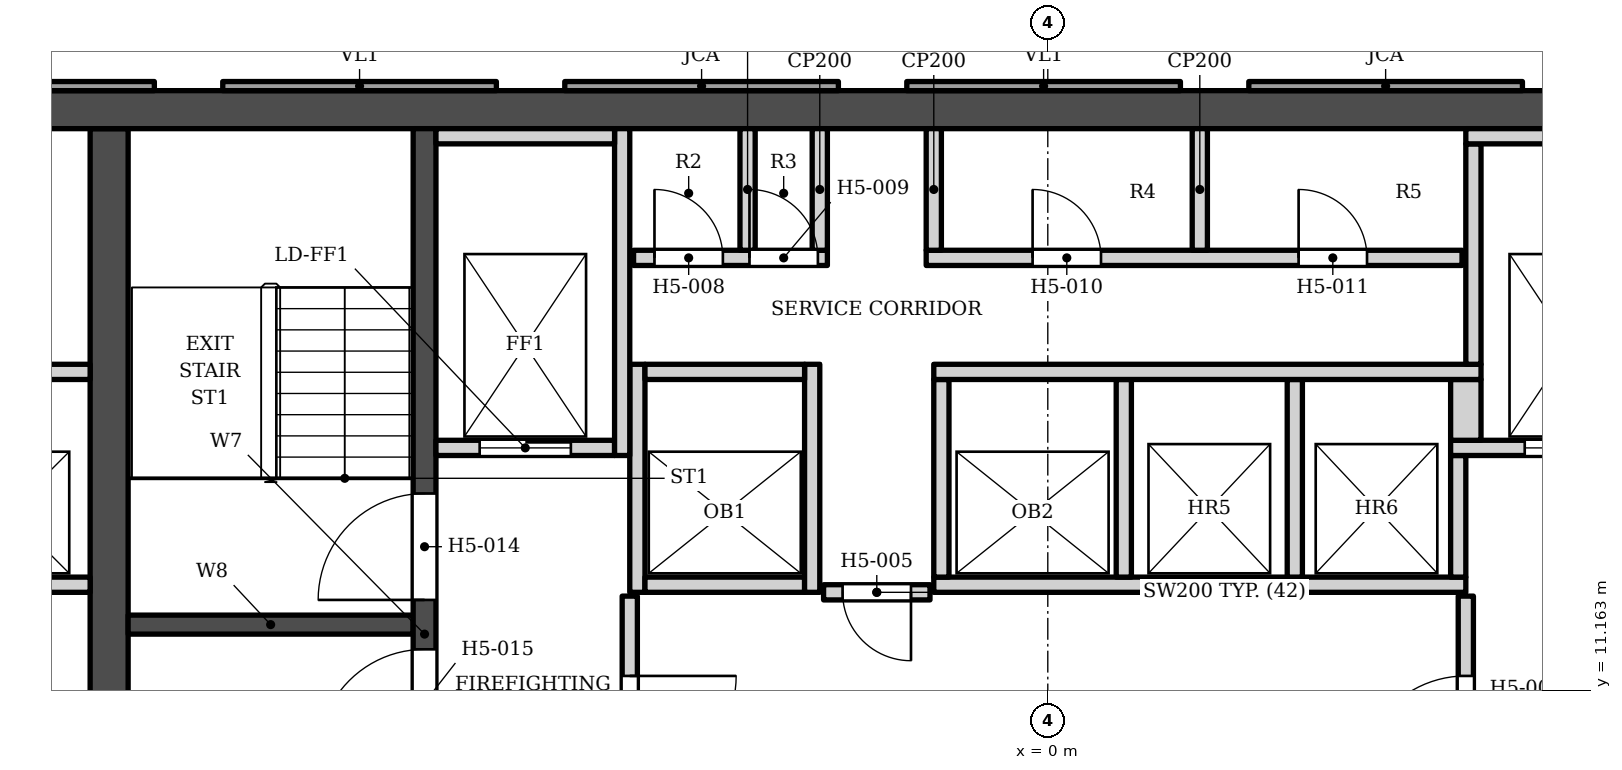
"""IFC4 building model, lengths in metres.
Left out: names, types, materials, properties, quantities, classifications, styles, units other than length and angle.
Written with IfcOpenShell. Run it as: python <this file> out.ifc"""

import sys

from ifc_helpers import new_model, si_unit, direction, frame, frame_2d, origin, place, context, subcontext, project, spatial, polyline, rectangle, outline, extrude, element, fill, save


model = new_model("IFC4")
c1 = context("Model", 3, precision=1e-05, world=origin(), true_north=direction((0.0, 1.0)))
c2 = subcontext(c1, "Body", "Model", "MODEL_VIEW")
j1 = project(units=[si_unit("LENGTHUNIT", "METRE"), si_unit("PLANEANGLEUNIT", "RADIAN")], contexts=[c1])
p1 = place(None, origin())
s1 = spatial("IfcSite", under=j1, at=p1, CompositionType="ELEMENT")
p2 = place(p1, origin())
s2 = spatial("IfcBuilding", under=s1, at=p2, CompositionType="ELEMENT")
p3 = place(p2, frame((0.0, 0.0, 91.8)))
s3 = spatial("IfcBuildingStorey", under=s2, at=p3, CompositionType="ELEMENT", Elevation=91.8)
p4 = place(p3, frame((-16.9, 18.802, 0.0), z_axis=(0.0, 0.0, 1.0), x_axis=(1.0, 0.0, 0.0)))
e1 = element("IfcWall", 1, at=p4, inside=s3, PredefinedType="SHEAR", context=c2, shape_type="SweptSolid", body=[
    extrude(rectangle(XDim=33.8, YDim=0.5, at=frame_2d((16.9, 0.0))), origin(), (0.0, 0.0, 1.0), 3.4),
])
p5 = place(p3, frame((-12.35, 5.253, 0.0), z_axis=(0.0, 0.0, 1.0), x_axis=(0.0, 1.0, 0.0)))
e2 = element("IfcWall", 2, at=p5, inside=s3, PredefinedType="SHEAR", context=c2, shape_type="SweptSolid", body=[
    extrude(rectangle(XDim=13.3, YDim=0.5, at=frame_2d((6.65, 0.0))), origin(), (0.0, 0.0, 1.0), 3.4),
])
p6 = place(p3, frame((-8.2, 5.253, 0.0), z_axis=(0.0, 0.0, 1.0), x_axis=(0.0, 1.0, 0.0)))
e3 = element("IfcWall", 3, at=p6, inside=s3, PredefinedType="SHEAR", context=c2, shape_type="SweptSolid", body=[
    extrude(rectangle(XDim=13.3, YDim=0.3, at=frame_2d((6.65, 0.0))), origin(), (0.0, 0.0, 1.0), 3.4),
])
p7 = place(p6, frame((7.1, 0.0, 0.0)))
e4 = element("IfcOpeningElement", 4, at=p7, cuts=e3, PredefinedType="OPENING", context=c2, shape_type="SweptSolid", body=[
    extrude(rectangle(XDim=1.4, YDim=2.1, at=frame_2d((0.7, 1.05))), frame((0.0, 0.16, 0.0), z_axis=(0.0, -1.0, 0.0), x_axis=(1.0, 0.0, 0.0)), (0.0, 0.0, 1.0), 0.32),
])
p8 = place(p6, frame((5.05, 0.0, 0.0)))
e5 = element("IfcOpeningElement", 5, at=p8, cuts=e3, PredefinedType="OPENING", context=c2, shape_type="SweptSolid", body=[
    extrude(rectangle(XDim=1.4, YDim=2.1, at=frame_2d((0.7, 1.05))), frame((0.0, 0.16, 0.0), z_axis=(0.0, -1.0, 0.0), x_axis=(1.0, 0.0, 0.0)), (0.0, 0.0, 1.0), 0.32),
])
p9 = place(p3, frame((-12.1, 12.028, 0.0), z_axis=(0.0, 0.0, 1.0), x_axis=(1.0, 0.0, 0.0)))
e6 = element("IfcWall", 6, at=p9, inside=s3, PredefinedType="SHEAR", context=c2, shape_type="SweptSolid", body=[
    extrude(rectangle(XDim=3.75, YDim=0.25, at=frame_2d((1.875, 0.0))), origin(), (0.0, 0.0, 1.0), 3.4),
])
p10 = place(p3, origin())
e7 = element("IfcWall", 7, at=p10, inside=s3, PredefinedType="SOLIDWALL", context=c2, shape_type="SweptSolid", body=[
    extrude(outline(polyline([(2.645, 19.173), (2.645, 19.052), (6.245, 19.052), (6.245, 19.173), (2.645, 19.173)])), origin(), (0.0, 0.0, 1.0), 2.65),
])
p11 = place(p3, origin())
e8 = element("IfcWall", 8, at=p11, inside=s3, PredefinedType="ELEMENTEDWALL", context=c2, shape_type="SweptSolid", body=[
    extrude(outline(polyline([(-1.855, 19.173), (-1.855, 19.052), (1.745, 19.052), (1.745, 19.173), (-1.855, 19.173)])), origin(), (0.0, 0.0, 1.0), 2.65),
])
p12 = place(p3, origin())
e9 = element("IfcWall", 9, at=p12, inside=s3, PredefinedType="SOLIDWALL", context=c2, shape_type="SweptSolid", body=[
    extrude(outline(polyline([(-6.355, 19.173), (-6.355, 19.052), (-2.755, 19.052), (-2.755, 19.173), (-6.355, 19.173)])), origin(), (0.0, 0.0, 1.0), 2.65),
])
p13 = place(p3, origin())
e10 = element("IfcWall", 10, at=p13, inside=s3, PredefinedType="ELEMENTEDWALL", context=c2, shape_type="SweptSolid", body=[
    extrude(outline(polyline([(-10.855, 19.173), (-10.855, 19.052), (-7.255, 19.052), (-7.255, 19.173), (-10.855, 19.173)])), origin(), (0.0, 0.0, 1.0), 2.65),
])
p14 = place(p3, origin())
e11 = element("IfcWall", 11, at=p14, inside=s3, PredefinedType="SOLIDWALL", context=c2, shape_type="SweptSolid", body=[
    extrude(outline(polyline([(-15.354, 19.173), (-15.354, 19.052), (-11.755, 19.052), (-11.755, 19.173), (-15.354, 19.173)])), origin(), (0.0, 0.0, 1.0), 2.65),
])
p15 = place(p3, frame((-5.5, 9.103, 0.0), z_axis=(0.0, 0.0, 1.0), x_axis=(0.0, 1.0, 0.0)))
e12 = element("IfcWall", 12, at=p15, inside=s3, PredefinedType="SOLIDWALL", context=c2, shape_type="SweptSolid", body=[
    extrude(rectangle(XDim=3.3, YDim=0.2, at=frame_2d((1.65, 0.0))), origin(), (0.0, 0.0, 1.0), 3.23),
])
p16 = place(p15, frame((0.85, 0.0, 0.0)))
e13 = element("IfcOpeningElement", 13, at=p16, cuts=e12, PredefinedType="OPENING", context=c2, shape_type="SweptSolid", body=[
    extrude(rectangle(XDim=1.4, YDim=2.1, at=frame_2d((0.7, 1.05))), frame((0.0, 0.11, 0.0), z_axis=(0.0, -1.0, 0.0), x_axis=(1.0, 0.0, 0.0)), (0.0, 0.0, 1.0), 0.22),
])
p17 = place(p3, frame((5.5, 9.103, 0.0), z_axis=(0.0, 0.0, 1.0), x_axis=(0.0, 1.0, 0.0)))
e14 = element("IfcWall", 14, at=p17, inside=s3, PredefinedType="SOLIDWALL", context=c2, shape_type="SweptSolid", body=[
    extrude(rectangle(XDim=3.3, YDim=0.2, at=frame_2d((1.65, 0.0))), origin(), (0.0, 0.0, 1.0), 3.23),
])
p18 = place(p17, frame((0.85, 0.0, 0.0)))
e15 = element("IfcOpeningElement", 15, at=p18, cuts=e14, PredefinedType="OPENING", context=c2, shape_type="SweptSolid", body=[
    extrude(rectangle(XDim=1.4, YDim=2.1, at=frame_2d((0.7, 1.05))), frame((0.0, 0.11, 0.0), z_axis=(0.0, -1.0, 0.0), x_axis=(1.0, 0.0, 0.0)), (0.0, 0.0, 1.0), 0.22),
])
p19 = place(p3, frame((-2.95, 12.453, 0.0), z_axis=(0.0, 0.0, 1.0), x_axis=(1.0, 0.0, 0.0)))
e16 = element("IfcWall", 16, at=p19, inside=s3, PredefinedType="SOLIDWALL", context=c2, shape_type="SweptSolid", body=[
    extrude(rectangle(XDim=1.4, YDim=0.2, at=frame_2d((0.7, 0.0))), origin(), (0.0, 0.0, 1.0), 3.23),
])
p20 = place(p19, frame((0.25, 0.0, 0.0)))
e17 = element("IfcOpeningElement", 17, at=p20, cuts=e16, PredefinedType="OPENING", context=c2, shape_type="SweptSolid", body=[
    extrude(rectangle(XDim=0.9, YDim=2.1, at=frame_2d((0.45, 1.05))), frame((0.0, 0.11, 0.0), z_axis=(0.0, -1.0, 0.0), x_axis=(1.0, 0.0, 0.0)), (0.0, 0.0, 1.0), 0.22),
])
p21 = place(p3, frame((-16.9, 12.552, 0.0), z_axis=(0.0, 0.0, 1.0), x_axis=(1.0, 0.0, 0.0)))
e18 = element("IfcWall", 18, at=p21, inside=s3, PredefinedType="SOLIDWALL", context=c2, shape_type="SweptSolid", body=[
    extrude(rectangle(XDim=4.3, YDim=0.2, at=frame_2d((2.15, 0.0))), origin(), (0.0, 0.0, 1.0), 3.23),
])
p22 = place(p21, frame((2.675, 0.0, 0.0)))
e19 = element("IfcOpeningElement", 19, at=p22, cuts=e18, PredefinedType="OPENING", context=c2, shape_type="SweptSolid", body=[
    extrude(rectangle(XDim=1.1, YDim=2.1, at=frame_2d((0.55, 1.05))), frame((0.0, 0.11, 0.0), z_axis=(0.0, -1.0, 0.0), x_axis=(1.0, 0.0, 0.0)), (0.0, 0.0, 1.0), 0.22),
])
p23 = place(p21, frame((0.425, 0.0, 0.0)))
e20 = element("IfcOpeningElement", 20, at=p23, cuts=e18, PredefinedType="OPENING", context=c2, shape_type="SweptSolid", body=[
    extrude(rectangle(XDim=1.1, YDim=2.1, at=frame_2d((0.55, 1.05))), frame((0.0, 0.11, 0.0), z_axis=(0.0, -1.0, 0.0), x_axis=(1.0, 0.0, 0.0)), (0.0, 0.0, 1.0), 0.22),
])
p24 = place(p3, frame((-5.4, 12.453, 0.0), z_axis=(0.0, 0.0, 1.0), x_axis=(0.0, 1.0, 0.0)))
e21 = element("IfcWall", 21, at=p24, inside=s3, PredefinedType="SOLIDWALL", context=c2, shape_type="SweptSolid", body=[
    extrude(rectangle(XDim=3.0, YDim=0.2, at=frame_2d((1.5, 0.0))), origin(), (0.0, 0.0, 1.0), 3.23),
])
p25 = place(p3, frame((-5.3, 12.552, 0.0), z_axis=(0.0, 0.0, 1.0), x_axis=(1.0, 0.0, 0.0)))
e22 = element("IfcWall", 22, at=p25, inside=s3, PredefinedType="SOLIDWALL", context=c2, shape_type="SweptSolid", body=[
    extrude(rectangle(XDim=2.1, YDim=0.2, at=frame_2d((1.05, 0.0))), origin(), (0.0, 0.0, 1.0), 3.23),
])
p26 = place(p3, frame((-3.1, 12.453, 0.0), z_axis=(0.0, 0.0, 1.0), x_axis=(0.0, 1.0, 0.0)))
e23 = element("IfcWall", 23, at=p26, inside=s3, PredefinedType="SOLIDWALL", context=c2, shape_type="SweptSolid", body=[
    extrude(rectangle(XDim=3.0, YDim=0.2, at=frame_2d((1.5, 0.0))), origin(), (0.0, 0.0, 1.0), 3.23),
])
p27 = place(p3, frame((-1.5, 12.552, 0.0), z_axis=(0.0, 0.0, 1.0), x_axis=(1.0, 0.0, 0.0)))
e24 = element("IfcWall", 24, at=p27, inside=s3, PredefinedType="SOLIDWALL", context=c2, shape_type="SweptSolid", body=[
    extrude(rectangle(XDim=7.0, YDim=0.2, at=frame_2d((3.5, 0.0))), origin(), (0.0, 0.0, 1.0), 3.23),
])
for number, where, z_axis, x_axis in (
    (25, (-1.4, 12.653, 0.0), (0.0, 0.0, 1.0), (0.0, 1.0, 0.0)),
    (26, (1.0, 12.653, 0.0), (0.0, 0.0, 1.0), (0.0, 1.0, 0.0)),
    (27, (3.25, 12.653, 0.0), (0.0, 0.0, 1.0), (0.0, 1.0, 0.0)),
):
    element("IfcWall", number, at=place(p3, frame(where, z_axis=z_axis, x_axis=x_axis)), inside=s3, PredefinedType="SOLIDWALL", context=c2, shape_type="SweptSolid", body=[
        extrude(rectangle(XDim=2.6, YDim=0.2, at=frame_2d((1.3, 0.0))), origin(), (0.0, 0.0, 1.0), 3.23),
    ])
p28 = place(p3, frame((5.4, 12.653, 0.0), z_axis=(0.0, 0.0, 1.0), x_axis=(0.0, 1.0, 0.0)))
e28 = element("IfcWall", 28, at=p28, inside=s3, PredefinedType="SOLIDWALL", context=c2, shape_type="SweptSolid", body=[
    extrude(rectangle(XDim=1.6, YDim=0.2, at=frame_2d((0.8, 0.0))), origin(), (0.0, 0.0, 1.0), 3.23),
])
p29 = place(p3, frame((-8.05, 14.353, 0.0), z_axis=(0.0, 0.0, 1.0), x_axis=(1.0, 0.0, 0.0)))
e29 = element("IfcWall", 29, at=p29, inside=s3, PredefinedType="SOLIDWALL", context=c2, shape_type="SweptSolid", body=[
    extrude(rectangle(XDim=2.35, YDim=0.2, at=frame_2d((1.175, 0.0))), origin(), (0.0, 0.0, 1.0), 3.23),
])
p30 = place(p29, frame((0.575, 0.0, 0.0)))
e30 = element("IfcOpeningElement", 30, at=p30, cuts=e29, PredefinedType="OPENING", context=c2, shape_type="SweptSolid", body=[
    extrude(rectangle(XDim=1.2, YDim=2.1, at=frame_2d((0.6, 1.05))), frame((0.0, 0.11, 0.0), z_axis=(0.0, -1.0, 0.0), x_axis=(1.0, 0.0, 0.0)), (0.0, 0.0, 1.0), 0.22),
])
p31 = place(p3, frame((-5.6, 14.253, 0.0), z_axis=(0.0, 0.0, 1.0), x_axis=(0.0, 1.0, 0.0)))
e31 = element("IfcWall", 31, at=p31, inside=s3, PredefinedType="SOLIDWALL", context=c2, shape_type="SweptSolid", body=[
    extrude(rectangle(XDim=4.3, YDim=0.2, at=frame_2d((2.15, 0.0))), origin(), (0.0, 0.0, 1.0), 3.23),
])
p32 = place(p3, frame((5.3, 14.353, 0.0), z_axis=(0.0, 0.0, 1.0), x_axis=(1.0, 0.0, 0.0)))
e32 = element("IfcWall", 32, at=p32, inside=s3, PredefinedType="SOLIDWALL", context=c2, shape_type="SweptSolid", body=[
    extrude(rectangle(XDim=2.75, YDim=0.2, at=frame_2d((1.375, 0.0))), origin(), (0.0, 0.0, 1.0), 3.23),
])
p33 = place(p32, frame((0.975, 0.0, 0.0)))
e33 = element("IfcOpeningElement", 33, at=p33, cuts=e32, PredefinedType="OPENING", context=c2, shape_type="SweptSolid", body=[
    extrude(rectangle(XDim=1.2, YDim=2.1, at=frame_2d((0.6, 1.05))), frame((0.0, 0.11, 0.0), z_axis=(0.0, -1.0, 0.0), x_axis=(1.0, 0.0, 0.0)), (0.0, 0.0, 1.0), 0.22),
])
p34 = place(p3, frame((5.5, 14.453, 0.0), z_axis=(0.0, 0.0, 1.0), x_axis=(0.0, 1.0, 0.0)))
e34 = element("IfcWall", 34, at=p34, inside=s3, PredefinedType="SOLIDWALL", context=c2, shape_type="SweptSolid", body=[
    extrude(rectangle(XDim=0.8, YDim=0.4, at=frame_2d((0.4, 0.0))), origin(), (0.0, 0.0, 1.0), 3.23),
])
p35 = place(p3, frame((-16.9, 15.353, 0.0), z_axis=(0.0, 0.0, 1.0), x_axis=(1.0, 0.0, 0.0)))
e35 = element("IfcWall", 35, at=p35, inside=s3, PredefinedType="SOLIDWALL", context=c2, shape_type="SweptSolid", body=[
    extrude(rectangle(XDim=4.3, YDim=0.2, at=frame_2d((2.15, 0.0))), origin(), (0.0, 0.0, 1.0), 3.23),
])
p36 = place(p3, frame((-5.3, 15.353, 0.0), z_axis=(0.0, 0.0, 1.0), x_axis=(1.0, 0.0, 0.0)))
e36 = element("IfcWall", 36, at=p36, inside=s3, PredefinedType="SOLIDWALL", context=c2, shape_type="SweptSolid", body=[
    extrude(rectangle(XDim=2.1, YDim=0.2, at=frame_2d((1.05, 0.0))), origin(), (0.0, 0.0, 1.0), 3.23),
])
p37 = place(p3, frame((-1.5, 15.353, 0.0), z_axis=(0.0, 0.0, 1.0), x_axis=(1.0, 0.0, 0.0)))
e37 = element("IfcWall", 37, at=p37, inside=s3, PredefinedType="SOLIDWALL", context=c2, shape_type="SweptSolid", body=[
    extrude(rectangle(XDim=7.2, YDim=0.2, at=frame_2d((3.6, 0.0))), origin(), (0.0, 0.0, 1.0), 3.23),
])
p38 = place(p3, frame((5.6, 15.453, 0.0), z_axis=(0.0, 0.0, 1.0), x_axis=(0.0, 1.0, 0.0)))
e38 = element("IfcWall", 38, at=p38, inside=s3, PredefinedType="SOLIDWALL", context=c2, shape_type="SweptSolid", body=[
    extrude(rectangle(XDim=2.9, YDim=0.2, at=frame_2d((1.45, 0.0))), origin(), (0.0, 0.0, 1.0), 3.23),
])
p39 = place(p3, frame((-5.45, 16.853, 0.0), z_axis=(0.0, 0.0, 1.0), x_axis=(1.0, 0.0, 0.0)))
e39 = element("IfcWall", 39, at=p39, inside=s3, PredefinedType="SOLIDWALL", context=c2, shape_type="SweptSolid", body=[
    extrude(rectangle(XDim=2.55, YDim=0.2, at=frame_2d((1.275, 0.0))), origin(), (0.0, 0.0, 1.0), 3.23),
])
p40 = place(p39, frame((0.275, 0.0, 0.0)))
e40 = element("IfcOpeningElement", 40, at=p40, cuts=e39, PredefinedType="OPENING", context=c2, shape_type="SweptSolid", body=[
    extrude(rectangle(XDim=0.9, YDim=2.1, at=frame_2d((0.45, 1.05))), frame((0.0, 0.11, 0.0), z_axis=(0.0, -1.0, 0.0), x_axis=(1.0, 0.0, 0.0)), (0.0, 0.0, 1.0), 0.22),
])
p41 = place(p39, frame((1.525, 0.0, 0.0)))
e41 = element("IfcOpeningElement", 41, at=p41, cuts=e39, PredefinedType="OPENING", context=c2, shape_type="SweptSolid", body=[
    extrude(rectangle(XDim=0.9, YDim=2.1, at=frame_2d((0.45, 1.05))), frame((0.0, 0.11, 0.0), z_axis=(0.0, -1.0, 0.0), x_axis=(1.0, 0.0, 0.0)), (0.0, 0.0, 1.0), 0.22),
])
p42 = place(p3, frame((-1.6, 16.853, 0.0), z_axis=(0.0, 0.0, 1.0), x_axis=(1.0, 0.0, 0.0)))
e42 = element("IfcWall", 42, at=p42, inside=s3, PredefinedType="SOLIDWALL", context=c2, shape_type="SweptSolid", body=[
    extrude(rectangle(XDim=7.05, YDim=0.2, at=frame_2d((3.525, 0.0))), origin(), (0.0, 0.0, 1.0), 3.23),
])
p43 = place(p42, frame((1.4, 0.0, 0.0)))
e43 = element("IfcOpeningElement", 43, at=p43, cuts=e42, PredefinedType="OPENING", context=c2, shape_type="SweptSolid", body=[
    extrude(rectangle(XDim=0.9, YDim=2.1, at=frame_2d((0.45, 1.05))), frame((0.0, 0.11, 0.0), z_axis=(0.0, -1.0, 0.0), x_axis=(1.0, 0.0, 0.0)), (0.0, 0.0, 1.0), 0.22),
])
p44 = place(p42, frame((4.9, 0.0, 0.0)))
e44 = element("IfcOpeningElement", 44, at=p44, cuts=e42, PredefinedType="OPENING", context=c2, shape_type="SweptSolid", body=[
    extrude(rectangle(XDim=0.9, YDim=2.1, at=frame_2d((0.45, 1.05))), frame((0.0, 0.11, 0.0), z_axis=(0.0, -1.0, 0.0), x_axis=(1.0, 0.0, 0.0)), (0.0, 0.0, 1.0), 0.22),
])
for number, where, z_axis, x_axis in (
    (45, (-3.95, 16.953, 0.0), (0.0, 0.0, 1.0), (0.0, 1.0, 0.0)),
    (46, (-3.0, 16.953, 0.0), (0.0, 0.0, 1.0), (0.0, 1.0, 0.0)),
    (47, (-1.5, 16.953, 0.0), (0.0, 0.0, 1.0), (0.0, 1.0, 0.0)),
    (48, (2.0, 16.953, 0.0), (0.0, 0.0, 1.0), (0.0, 1.0, 0.0)),
):
    element("IfcWall", number, at=place(p3, frame(where, z_axis=z_axis, x_axis=x_axis)), inside=s3, PredefinedType="PARTITIONING", context=c2, shape_type="SweptSolid", body=[
        extrude(rectangle(XDim=1.6, YDim=0.2, at=frame_2d((0.8, 0.0))), origin(), (0.0, 0.0, 1.0), 3.23),
    ])
p45 = place(p3, frame((-8.05, 18.453, 0.0), z_axis=(0.0, 0.0, 1.0), x_axis=(1.0, 0.0, 0.0)))
e49 = element("IfcWall", 49, at=p45, inside=s3, PredefinedType="SOLIDWALL", context=c2, shape_type="SweptSolid", body=[
    extrude(rectangle(XDim=2.35, YDim=0.2, at=frame_2d((1.175, 0.0))), origin(), (0.0, 0.0, 1.0), 3.23),
])
p46 = place(p3, frame((5.5, 18.453, 0.0), z_axis=(0.0, 0.0, 1.0), x_axis=(1.0, 0.0, 0.0)))
e50 = element("IfcWall", 50, at=p46, inside=s3, PredefinedType="SOLIDWALL", context=c2, shape_type="SweptSolid", body=[
    extrude(rectangle(XDim=2.55, YDim=0.2, at=frame_2d((1.275, 0.0))), origin(), (0.0, 0.0, 1.0), 3.23),
])
p47 = place(p30, origin())
e51 = element("IfcDoor", 51, at=p47, inside=s3, OperationType="DOUBLE_DOOR_SLIDING", PredefinedType="DOOR", context=c2, shape_type="SweptSolid", body=[
    extrude(rectangle(XDim=1.2, YDim=2.1, at=frame_2d((0.6, 1.05))), frame((0.0, 0.025, 0.0), z_axis=(0.0, -1.0, 0.0), x_axis=(1.0, 0.0, 0.0)), (0.0, 0.0, 1.0), 0.05),
])
fill(e30, e51)
p48 = place(p33, origin())
e52 = element("IfcDoor", 52, at=p48, inside=s3, OperationType="DOUBLE_DOOR_SLIDING", PredefinedType="DOOR", context=c2, shape_type="SweptSolid", body=[
    extrude(rectangle(XDim=1.2, YDim=2.1, at=frame_2d((0.6, 1.05))), frame((0.0, 0.025, 0.0), z_axis=(0.0, -1.0, 0.0), x_axis=(1.0, 0.0, 0.0)), (0.0, 0.0, 1.0), 0.05),
])
fill(e33, e52)
p49 = place(p7, origin())
e53 = element("IfcDoor", 53, at=p49, inside=s3, OperationType="SINGLE_SWING_LEFT", PredefinedType="DOOR", context=c2, shape_type="SweptSolid", body=[
    extrude(rectangle(XDim=1.4, YDim=2.1, at=frame_2d((0.7, 1.05))), frame((0.0, 0.025, 0.0), z_axis=(0.0, -1.0, 0.0), x_axis=(1.0, 0.0, 0.0)), (0.0, 0.0, 1.0), 0.05),
])
fill(e4, e53)
p50 = place(p8, origin())
e54 = element("IfcDoor", 54, at=p50, inside=s3, OperationType="SINGLE_SWING_LEFT", PredefinedType="DOOR", context=c2, shape_type="SweptSolid", body=[
    extrude(rectangle(XDim=1.4, YDim=2.1, at=frame_2d((0.7, 1.05))), frame((0.0, 0.025, 0.0), z_axis=(0.0, -1.0, 0.0), x_axis=(1.0, 0.0, 0.0)), (0.0, 0.0, 1.0), 0.05),
])
fill(e5, e54)
p51 = place(p20, origin())
e55 = element("IfcDoor", 55, at=p51, inside=s3, OperationType="SINGLE_SWING_RIGHT", PredefinedType="DOOR", context=c2, shape_type="SweptSolid", body=[
    extrude(rectangle(XDim=0.9, YDim=2.1, at=frame_2d((0.45, 1.05))), frame((0.0, 0.025, 0.0), z_axis=(0.0, -1.0, 0.0), x_axis=(1.0, 0.0, 0.0)), (0.0, 0.0, 1.0), 0.05),
])
fill(e17, e55)
p52 = place(p16, origin())
e56 = element("IfcDoor", 56, at=p52, inside=s3, OperationType="SINGLE_SWING_RIGHT", PredefinedType="DOOR", context=c2, shape_type="SweptSolid", body=[
    extrude(rectangle(XDim=1.4, YDim=2.1, at=frame_2d((0.7, 1.05))), frame((0.0, 0.025, 0.0), z_axis=(0.0, -1.0, 0.0), x_axis=(1.0, 0.0, 0.0)), (0.0, 0.0, 1.0), 0.05),
])
fill(e13, e56)
p53 = place(p18, origin())
e57 = element("IfcDoor", 57, at=p53, inside=s3, OperationType="SINGLE_SWING_LEFT", PredefinedType="DOOR", context=c2, shape_type="SweptSolid", body=[
    extrude(rectangle(XDim=1.4, YDim=2.1, at=frame_2d((0.7, 1.05))), frame((0.0, 0.025, 0.0), z_axis=(0.0, -1.0, 0.0), x_axis=(1.0, 0.0, 0.0)), (0.0, 0.0, 1.0), 0.05),
])
fill(e15, e57)
p54 = place(p40, origin())
e58 = element("IfcDoor", 58, at=p54, inside=s3, OperationType="SINGLE_SWING_LEFT", PredefinedType="DOOR", context=c2, shape_type="SweptSolid", body=[
    extrude(rectangle(XDim=0.9, YDim=2.1, at=frame_2d((0.45, 1.05))), frame((0.0, 0.025, 0.0), z_axis=(0.0, -1.0, 0.0), x_axis=(1.0, 0.0, 0.0)), (0.0, 0.0, 1.0), 0.05),
])
fill(e40, e58)
p55 = place(p41, origin())
e59 = element("IfcDoor", 59, at=p55, inside=s3, OperationType="SINGLE_SWING_LEFT", PredefinedType="DOOR", context=c2, shape_type="SweptSolid", body=[
    extrude(rectangle(XDim=0.9, YDim=2.1, at=frame_2d((0.45, 1.05))), frame((0.0, 0.025, 0.0), z_axis=(0.0, -1.0, 0.0), x_axis=(1.0, 0.0, 0.0)), (0.0, 0.0, 1.0), 0.05),
])
fill(e41, e59)
p56 = place(p43, origin())
e60 = element("IfcDoor", 60, at=p56, inside=s3, OperationType="SINGLE_SWING_LEFT", PredefinedType="DOOR", context=c2, shape_type="SweptSolid", body=[
    extrude(rectangle(XDim=0.9, YDim=2.1, at=frame_2d((0.45, 1.05))), frame((0.0, 0.025, 0.0), z_axis=(0.0, -1.0, 0.0), x_axis=(1.0, 0.0, 0.0)), (0.0, 0.0, 1.0), 0.05),
])
fill(e43, e60)
p57 = place(p44, origin())
e61 = element("IfcDoor", 61, at=p57, inside=s3, OperationType="SINGLE_SWING_LEFT", PredefinedType="DOOR", context=c2, shape_type="SweptSolid", body=[
    extrude(rectangle(XDim=0.9, YDim=2.1, at=frame_2d((0.45, 1.05))), frame((0.0, 0.025, 0.0), z_axis=(0.0, -1.0, 0.0), x_axis=(1.0, 0.0, 0.0)), (0.0, 0.0, 1.0), 0.05),
])
fill(e44, e61)
save(model, sys.argv[1])
